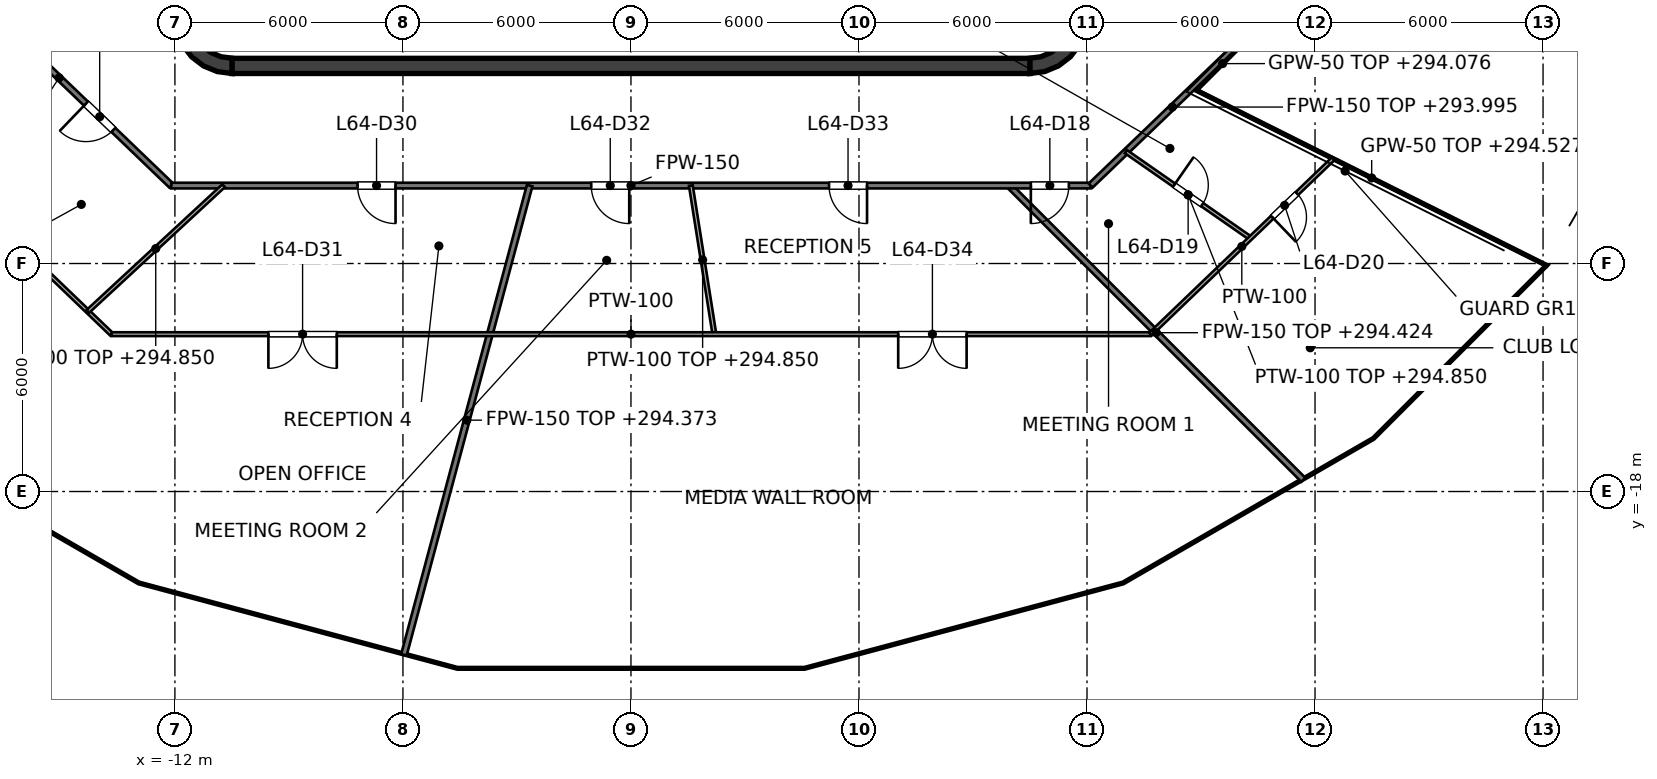
"""IFC4 building model, lengths in metres.
Left out: names, types, materials, properties, quantities, classifications, styles, units other than length and angle.
Written with IfcOpenShell. Run it as: python <this file> out.ifc"""

import sys

from ifc_helpers import new_model, si_unit, direction, frame, frame_2d, origin, place, context, subcontext, project, spatial, polyline, rectangle, outline, extrude, element, fill, save


model = new_model("IFC4")
c1 = context("Model", 3, precision=1e-05, world=origin(), true_north=direction((0.0, 1.0)))
c2 = subcontext(c1, "Body", "Model", "MODEL_VIEW")
j1 = project(units=[si_unit("LENGTHUNIT", "METRE"), si_unit("PLANEANGLEUNIT", "RADIAN")], contexts=[c1])
p1 = place(None, origin())
s1 = spatial("IfcSite", under=j1, at=p1, CompositionType="ELEMENT")
p2 = place(p1, origin())
s2 = spatial("IfcBuilding", under=s1, at=p2, CompositionType="ELEMENT")
p3 = place(p2, frame((0.0, 0.0, 291.0)))
s3 = spatial("IfcBuildingStorey", under=s2, at=p3, CompositionType="ELEMENT", Elevation=291.0)
p4 = place(p3, frame((-10.5, -6.8, 0.0), z_axis=(0.0, 0.0, 1.0), x_axis=(1.0, 0.0, 0.0)))
e1 = element("IfcWall", 1, at=p4, inside=s3, PredefinedType="SHEAR", context=c2, shape_type="SweptSolid", body=[
    extrude(rectangle(XDim=21.0, YDim=0.4, at=frame_2d((10.5, 0.0))), origin(), (0.0, 0.0, 1.0), 4.0),
])
p5 = place(p3, origin())
e2 = element("IfcWall", 2, at=p5, inside=s3, PredefinedType="SHEAR", context=c2, shape_type="SweptSolid", body=[
    extrude(outline(polyline([(-10.5, -7.0), (-10.5, -6.596), (-10.784, -6.559), (-11.048, -6.45), (-11.275, -6.275), (-11.45, -6.048), (-11.559, -5.784), (-11.596, -5.5), (-12.0, -5.5), (-11.949, -5.888), (-11.799, -6.25), (-11.561, -6.561), (-11.25, -6.799), (-10.888, -6.949), (-10.5, -7.0)])), origin(), (0.0, 0.0, 1.0), 4.0),
])
e3 = element("IfcWall", 3, at=p5, inside=s3, PredefinedType="SHEAR", context=c2, shape_type="SweptSolid", body=[
    extrude(outline(polyline([(12.0, -5.5), (11.596, -5.5), (11.559, -5.784), (11.45, -6.048), (11.275, -6.275), (11.048, -6.45), (10.784, -6.559), (10.5, -6.596), (10.5, -7.0), (10.888, -6.949), (11.25, -6.799), (11.561, -6.561), (11.799, -6.25), (11.949, -5.888), (12.0, -5.5)])), origin(), (0.0, 0.0, 1.0), 4.0),
])
p6 = place(p3, frame((0.3, -6.6, 0.0), z_axis=(0.0, 0.0, 1.0), x_axis=(0.0, 1.0, 0.0)))
e4 = element("IfcWall", 4, at=p6, inside=s3, PredefinedType="PARTITIONING", context=c2, shape_type="SweptSolid", body=[
    extrude(rectangle(XDim=2.5, YDim=0.15, at=frame_2d((1.25, 0.0))), origin(), (0.0, 0.0, 1.0), 3.85),
])
p7 = place(p6, frame((0.8, 0.0, 0.0)))
e5 = element("IfcOpeningElement", 5, at=p7, cuts=e4, PredefinedType="OPENING", context=c2, shape_type="SweptSolid", body=[
    extrude(rectangle(XDim=0.9, YDim=2.1, at=frame_2d((0.45, 1.05))), frame((0.0, 0.075, 0.0), z_axis=(0.0, -1.0, 0.0), x_axis=(1.0, 0.0, 0.0)), (0.0, 0.0, 1.0), 0.15),
])
p8 = place(p3, frame((9.0, -6.6, 0.0), z_axis=(0.0, 0.0, 1.0), x_axis=(0.0, 1.0, 0.0)))
e6 = element("IfcWall", 6, at=p8, inside=s3, PredefinedType="SOLIDWALL", context=c2, shape_type="SweptSolid", body=[
    extrude(rectangle(XDim=2.5, YDim=0.25, at=frame_2d((1.25, 0.0))), origin(), (0.0, 0.0, 1.0), 3.85),
])
p9 = place(p8, frame((0.65, 0.0, 0.0)))
e7 = element("IfcOpeningElement", 7, at=p9, cuts=e6, PredefinedType="OPENING", context=c2, shape_type="SweptSolid", body=[
    extrude(rectangle(XDim=1.2, YDim=2.1, at=frame_2d((0.6, 1.05))), frame((0.0, 0.125, 0.0), z_axis=(0.0, -1.0, 0.0), x_axis=(1.0, 0.0, 0.0)), (0.0, 0.0, 1.0), 0.25),
])
p10 = place(p3, frame((-9.0, -6.6, 0.0), z_axis=(0.0, 0.0, 1.0), x_axis=(0.0, 1.0, 0.0)))
e8 = element("IfcWall", 8, at=p10, inside=s3, PredefinedType="PARTITIONING", context=c2, shape_type="SweptSolid", body=[
    extrude(rectangle(XDim=2.5, YDim=0.25, at=frame_2d((1.25, 0.0))), origin(), (0.0, 0.0, 1.0), 3.85),
])
p11 = place(p10, frame((0.75, 0.0, 0.0)))
e9 = element("IfcOpeningElement", 9, at=p11, cuts=e8, PredefinedType="OPENING", context=c2, shape_type="SweptSolid", body=[
    extrude(rectangle(XDim=1.0, YDim=2.1, at=frame_2d((0.5, 1.05))), frame((0.0, 0.125, 0.0), z_axis=(0.0, -1.0, 0.0), x_axis=(1.0, 0.0, 0.0)), (0.0, 0.0, 1.0), 0.25),
])
p12 = place(p3, frame((3.15, -6.6, 0.0), z_axis=(0.0, 0.0, 1.0), x_axis=(0.0, 1.0, 0.0)))
e10 = element("IfcWall", 10, at=p12, inside=s3, PredefinedType="SOLIDWALL", context=c2, shape_type="SweptSolid", body=[
    extrude(rectangle(XDim=2.5, YDim=0.25, at=frame_2d((1.25, 0.0))), origin(), (0.0, 0.0, 1.0), 3.85),
])
p13 = place(p3, frame((-2.9, -6.6, 0.0), z_axis=(0.0, 0.0, 1.0), x_axis=(0.0, 1.0, 0.0)))
e11 = element("IfcWall", 11, at=p13, inside=s3, PredefinedType="PARTITIONING", context=c2, shape_type="SweptSolid", body=[
    extrude(rectangle(XDim=2.5, YDim=0.25, at=frame_2d((1.25, 0.0))), origin(), (0.0, 0.0, 1.0), 3.85),
])
p14 = place(p13, frame((0.8, 0.0, 0.0)))
e12 = element("IfcOpeningElement", 12, at=p14, cuts=e11, PredefinedType="OPENING", context=c2, shape_type="SweptSolid", body=[
    extrude(rectangle(XDim=0.9, YDim=2.1, at=frame_2d((0.45, 1.05))), frame((0.0, 0.125, 0.0), z_axis=(0.0, -1.0, 0.0), x_axis=(1.0, 0.0, 0.0)), (0.0, 0.0, 1.0), 0.25),
])
p15 = place(p3, frame((9.949, -9.949, 0.0), z_axis=(0.0, 0.0, 1.0), x_axis=(0.707106781187, -0.707106781187, 0.0)))
e13 = element("IfcWall", 13, at=p15, inside=s3, PredefinedType="PARTITIONING", context=c2, shape_type="SweptSolid", body=[
    extrude(rectangle(XDim=10.95, YDim=0.15, at=frame_2d((5.475, 0.0))), origin(), (0.0, 0.0, 1.0), 3.424),
])
p16 = place(p3, frame((-18.0, -4.278, 0.0), z_axis=(0.0, 0.0, 1.0), x_axis=(0.721290181137, -0.692633001376, 0.0)))
e14 = element("IfcWall", 14, at=p16, inside=s3, PredefinedType="PARTITIONING", context=c2, shape_type="SweptSolid", body=[
    extrude(rectangle(XDim=8.187, YDim=0.15, at=frame_2d((4.094, 0.0))), origin(), (0.0, 0.0, 1.0), 2.927),
])
p17 = place(p16, frame((5.074, 0.0, 0.0)))
e15 = element("IfcOpeningElement", 15, at=p17, cuts=e14, PredefinedType="OPENING", context=c2, shape_type="SweptSolid", body=[
    extrude(rectangle(XDim=1.0, YDim=2.1, at=frame_2d((0.5, 1.05))), frame((0.0, 0.075, 0.0), z_axis=(0.0, -1.0, 0.0), x_axis=(1.0, 0.0, 0.0)), (0.0, 0.0, 1.0), 0.15),
])
p18 = place(p3, frame((-12.095, -9.949, 0.0), z_axis=(0.0, 0.0, 1.0), x_axis=(1.0, 0.0, 0.0)))
e16 = element("IfcWall", 16, at=p18, inside=s3, PredefinedType="PARTITIONING", context=c2, shape_type="SweptSolid", body=[
    extrude(rectangle(XDim=24.19, YDim=0.15, at=frame_2d((12.095, 0.0))), origin(), (0.0, 0.0, 1.0), 2.927),
])
p19 = place(p18, frame((22.617, 0.0, 0.0)))
e17 = element("IfcOpeningElement", 17, at=p19, cuts=e16, PredefinedType="OPENING", context=c2, shape_type="SweptSolid", body=[
    extrude(rectangle(XDim=1.0, YDim=2.1, at=frame_2d((0.5, 1.05))), frame((0.0, 0.075, 0.0), z_axis=(0.0, -1.0, 0.0), x_axis=(1.0, 0.0, 0.0)), (0.0, 0.0, 1.0), 0.15),
])
p20 = place(p18, frame((4.9, 0.0, 0.0)))
e18 = element("IfcOpeningElement", 18, at=p20, cuts=e16, PredefinedType="OPENING", context=c2, shape_type="SweptSolid", body=[
    extrude(rectangle(XDim=1.0, YDim=2.1, at=frame_2d((0.5, 1.05))), frame((0.0, 0.075, 0.0), z_axis=(0.0, -1.0, 0.0), x_axis=(1.0, 0.0, 0.0)), (0.0, 0.0, 1.0), 0.15),
])
p21 = place(p18, frame((11.05, 0.0, 0.0)))
e19 = element("IfcOpeningElement", 19, at=p21, cuts=e16, PredefinedType="OPENING", context=c2, shape_type="SweptSolid", body=[
    extrude(rectangle(XDim=1.0, YDim=2.1, at=frame_2d((0.5, 1.05))), frame((0.0, 0.075, 0.0), z_axis=(0.0, -1.0, 0.0), x_axis=(1.0, 0.0, 0.0)), (0.0, 0.0, 1.0), 0.15),
])
p22 = place(p18, frame((17.307, 0.0, 0.0)))
e20 = element("IfcOpeningElement", 20, at=p22, cuts=e16, PredefinedType="OPENING", context=c2, shape_type="SweptSolid", body=[
    extrude(rectangle(XDim=1.0, YDim=2.1, at=frame_2d((0.5, 1.05))), frame((0.0, 0.075, 0.0), z_axis=(0.0, -1.0, 0.0), x_axis=(1.0, 0.0, 0.0)), (0.0, 0.0, 1.0), 0.15),
])
p23 = place(p3, frame((12.095, -9.949, 0.0), z_axis=(0.0, 0.0, 1.0), x_axis=(0.721166452556, 0.692761826105, 0.0)))
e21 = element("IfcWall", 21, at=p23, inside=s3, PredefinedType="PARTITIONING", context=c2, shape_type="SweptSolid", body=[
    extrude(rectangle(XDim=5.965, YDim=0.15, at=frame_2d((2.982, 0.0))), origin(), (0.0, 0.0, 1.0), 2.995),
])
p24 = place(p3, frame((-5.974, -22.296, 0.0), z_axis=(0.0, 0.0, 1.0), x_axis=(0.258823917952, 0.9659245206, 0.0)))
e22 = element("IfcWall", 22, at=p24, inside=s3, PredefinedType="PARTITIONING", context=c2, shape_type="SweptSolid", body=[
    extrude(rectangle(XDim=12.782, YDim=0.15, at=frame_2d((6.391, 0.0))), origin(), (0.0, 0.0, 1.0), 3.373),
])
p25 = place(p3, frame((14.871, -7.438, 0.0), z_axis=(0.0, 0.0, 1.0), x_axis=(0.894365735238, -0.447336485918, 0.0)))
e23 = element("IfcWall", 23, at=p25, inside=s3, PredefinedType="PARTITIONING", context=c2, shape_type="SweptSolid", body=[
    extrude(rectangle(XDim=10.33, YDim=0.05, at=frame_2d((5.165, 0.0))), origin(), (0.0, 0.0, 1.0), 3.527),
])
p26 = place(p3, frame((14.871, -7.438, 0.0), z_axis=(0.0, 0.0, 1.0), x_axis=(0.707106781187, 0.707106781187, 0.0)))
e24 = element("IfcWall", 24, at=p26, inside=s3, PredefinedType="PARTITIONING", context=c2, shape_type="SweptSolid", body=[
    extrude(rectangle(XDim=1.976, YDim=0.05, at=frame_2d((0.988, 0.0))), origin(), (0.0, 0.0, 1.0), 3.076),
])
p27 = place(p3, frame((1.576, -9.949, 0.0), z_axis=(0.0, 0.0, 1.0), x_axis=(0.156402769976, -0.987693360079, 0.0)))
e25 = element("IfcWall", 25, at=p27, inside=s3, PredefinedType="PARTITIONING", context=c2, shape_type="SweptSolid", body=[
    extrude(rectangle(XDim=3.959, YDim=0.1, at=frame_2d((1.979, 0.0))), origin(), (0.0, 0.0, 1.0), 3.85),
])
p28 = place(p3, frame((-21.91, -5.944, 0.0), z_axis=(0.0, 0.0, 1.0), x_axis=(0.721193028331, -0.692734159608, 0.0)))
e26 = element("IfcWall", 26, at=p28, inside=s3, PredefinedType="PARTITIONING", context=c2, shape_type="SweptSolid", body=[
    extrude(rectangle(XDim=11.427, YDim=0.1, at=frame_2d((5.713, 0.0))), origin(), (0.0, 0.0, 1.0), 2.927),
])
p29 = place(p3, frame((13.024, -9.056, 0.0), z_axis=(0.0, 0.0, 1.0), x_axis=(0.820973820669, -0.570965835909, 0.0)))
e27 = element("IfcWall", 27, at=p29, inside=s3, PredefinedType="PARTITIONING", context=c2, shape_type="SweptSolid", body=[
    extrude(rectangle(XDim=3.988, YDim=0.1, at=frame_2d((1.994, 0.0))), origin(), (0.0, 0.0, 1.0), 3.85),
])
p30 = place(p29, frame((1.544, 0.0, 0.0)))
e28 = element("IfcOpeningElement", 28, at=p30, cuts=e27, PredefinedType="OPENING", context=c2, shape_type="SweptSolid", body=[
    extrude(rectangle(XDim=0.9, YDim=2.1, at=frame_2d((0.45, 1.05))), frame((0.0, 0.05, 0.0), z_axis=(0.0, -1.0, 0.0), x_axis=(1.0, 0.0, 0.0)), (0.0, 0.0, 1.0), 0.1),
])
p31 = place(p3, frame((-13.668, -13.859, 0.0), z_axis=(0.0, 0.0, 1.0), x_axis=(1.0, 0.0, 0.0)))
e29 = element("IfcWall", 29, at=p31, inside=s3, PredefinedType="PARTITIONING", context=c2, shape_type="SweptSolid", body=[
    extrude(rectangle(XDim=27.337, YDim=0.1, at=frame_2d((13.668, 0.0))), origin(), (0.0, 0.0, 1.0), 2.927),
])
p32 = place(p31, frame((4.127, 0.0, 0.0)))
e30 = element("IfcOpeningElement", 30, at=p32, cuts=e29, PredefinedType="OPENING", context=c2, shape_type="SweptSolid", body=[
    extrude(rectangle(XDim=1.8, YDim=2.1, at=frame_2d((0.9, 1.05))), frame((0.0, 0.05, 0.0), z_axis=(0.0, -1.0, 0.0), x_axis=(1.0, 0.0, 0.0)), (0.0, 0.0, 1.0), 0.1),
])
p33 = place(p31, frame((20.7, 0.0, 0.0)))
e31 = element("IfcOpeningElement", 31, at=p33, cuts=e29, PredefinedType="OPENING", context=c2, shape_type="SweptSolid", body=[
    extrude(rectangle(XDim=1.8, YDim=2.1, at=frame_2d((0.9, 1.05))), frame((0.0, 0.05, 0.0), z_axis=(0.0, -1.0, 0.0), x_axis=(1.0, 0.0, 0.0)), (0.0, 0.0, 1.0), 0.1),
])
p34 = place(p3, frame((-14.291, -13.26, 0.0), z_axis=(0.0, 0.0, 1.0), x_axis=(0.733889385895, 0.679268996253, 0.0)))
e32 = element("IfcWall", 32, at=p34, inside=s3, PredefinedType="PARTITIONING", context=c2, shape_type="SweptSolid", body=[
    extrude(rectangle(XDim=4.868, YDim=0.1, at=frame_2d((2.434, 0.0))), origin(), (0.0, 0.0, 1.0), 3.85),
])
p35 = place(p3, frame((13.669, -13.859, 0.0), z_axis=(0.0, 0.0, 1.0), x_axis=(0.721426111337, 0.692491419356, 0.0)))
e33 = element("IfcWall", 33, at=p35, inside=s3, PredefinedType="PARTITIONING", context=c2, shape_type="SweptSolid", body=[
    extrude(rectangle(XDim=6.666, YDim=0.1, at=frame_2d((3.333, 0.0))), origin(), (0.0, 0.0, 1.0), 2.927),
])
p36 = place(p35, frame((4.444, 0.0, 0.0)))
e34 = element("IfcOpeningElement", 34, at=p36, cuts=e33, PredefinedType="OPENING", context=c2, shape_type="SweptSolid", body=[
    extrude(rectangle(XDim=0.9, YDim=2.1, at=frame_2d((0.45, 1.05))), frame((0.0, 0.05, 0.0), z_axis=(0.0, -1.0, 0.0), x_axis=(1.0, 0.0, 0.0)), (0.0, 0.0, 1.0), 0.1),
])
p37 = place(p19, origin())
e35 = element("IfcDoor", 35, at=p37, inside=s3, OperationType="SINGLE_SWING_LEFT", PredefinedType="DOOR", context=c2, shape_type="SweptSolid", body=[
    extrude(rectangle(XDim=1.0, YDim=2.1, at=frame_2d((0.5, 1.05))), frame((0.0, 0.025, 0.0), z_axis=(0.0, -1.0, 0.0), x_axis=(1.0, 0.0, 0.0)), (0.0, 0.0, 1.0), 0.05),
])
fill(e17, e35)
p38 = place(p30, origin())
e36 = element("IfcDoor", 36, at=p38, inside=s3, OperationType="SINGLE_SWING_LEFT", PredefinedType="DOOR", context=c2, shape_type="SweptSolid", body=[
    extrude(rectangle(XDim=0.9, YDim=2.1, at=frame_2d((0.45, 1.05))), frame((0.0, 0.025, 0.0), z_axis=(0.0, -1.0, 0.0), x_axis=(1.0, 0.0, 0.0)), (0.0, 0.0, 1.0), 0.05),
])
fill(e28, e36)
p39 = place(p36, origin())
e37 = element("IfcDoor", 37, at=p39, inside=s3, OperationType="SINGLE_SWING_LEFT", PredefinedType="DOOR", context=c2, shape_type="SweptSolid", body=[
    extrude(rectangle(XDim=0.9, YDim=2.1, at=frame_2d((0.45, 1.05))), frame((0.0, 0.025, 0.0), z_axis=(0.0, -1.0, 0.0), x_axis=(1.0, 0.0, 0.0)), (0.0, 0.0, 1.0), 0.05),
])
fill(e34, e37)
p40 = place(p17, origin())
e38 = element("IfcDoor", 38, at=p40, inside=s3, OperationType="SINGLE_SWING_LEFT", PredefinedType="DOOR", context=c2, shape_type="SweptSolid", body=[
    extrude(rectangle(XDim=1.0, YDim=2.1, at=frame_2d((0.5, 1.05))), frame((0.0, 0.025, 0.0), z_axis=(0.0, -1.0, 0.0), x_axis=(1.0, 0.0, 0.0)), (0.0, 0.0, 1.0), 0.05),
])
fill(e15, e38)
p41 = place(p20, origin())
e39 = element("IfcDoor", 39, at=p41, inside=s3, OperationType="SINGLE_SWING_RIGHT", PredefinedType="DOOR", context=c2, shape_type="SweptSolid", body=[
    extrude(rectangle(XDim=1.0, YDim=2.1, at=frame_2d((0.5, 1.05))), frame((0.0, 0.025, 0.0), z_axis=(0.0, -1.0, 0.0), x_axis=(1.0, 0.0, 0.0)), (0.0, 0.0, 1.0), 0.05),
])
fill(e18, e39)
p42 = place(p32, origin())
e40 = element("IfcDoor", 40, at=p42, inside=s3, OperationType="DOUBLE_DOOR_SINGLE_SWING", PredefinedType="DOOR", context=c2, shape_type="SweptSolid", body=[
    extrude(rectangle(XDim=1.8, YDim=2.1, at=frame_2d((0.9, 1.05))), frame((0.0, 0.025, 0.0), z_axis=(0.0, -1.0, 0.0), x_axis=(1.0, 0.0, 0.0)), (0.0, 0.0, 1.0), 0.05),
])
fill(e30, e40)
p43 = place(p21, origin())
e41 = element("IfcDoor", 41, at=p43, inside=s3, OperationType="SINGLE_SWING_RIGHT", PredefinedType="DOOR", context=c2, shape_type="SweptSolid", body=[
    extrude(rectangle(XDim=1.0, YDim=2.1, at=frame_2d((0.5, 1.05))), frame((0.0, 0.025, 0.0), z_axis=(0.0, -1.0, 0.0), x_axis=(1.0, 0.0, 0.0)), (0.0, 0.0, 1.0), 0.05),
])
fill(e19, e41)
p44 = place(p22, origin())
e42 = element("IfcDoor", 42, at=p44, inside=s3, OperationType="SINGLE_SWING_RIGHT", PredefinedType="DOOR", context=c2, shape_type="SweptSolid", body=[
    extrude(rectangle(XDim=1.0, YDim=2.1, at=frame_2d((0.5, 1.05))), frame((0.0, 0.025, 0.0), z_axis=(0.0, -1.0, 0.0), x_axis=(1.0, 0.0, 0.0)), (0.0, 0.0, 1.0), 0.05),
])
fill(e20, e42)
p45 = place(p33, origin())
e43 = element("IfcDoor", 43, at=p45, inside=s3, OperationType="DOUBLE_DOOR_SINGLE_SWING", PredefinedType="DOOR", context=c2, shape_type="SweptSolid", body=[
    extrude(rectangle(XDim=1.8, YDim=2.1, at=frame_2d((0.9, 1.05))), frame((0.0, 0.025, 0.0), z_axis=(0.0, -1.0, 0.0), x_axis=(1.0, 0.0, 0.0)), (0.0, 0.0, 1.0), 0.05),
])
fill(e31, e43)
save(model, sys.argv[1])
